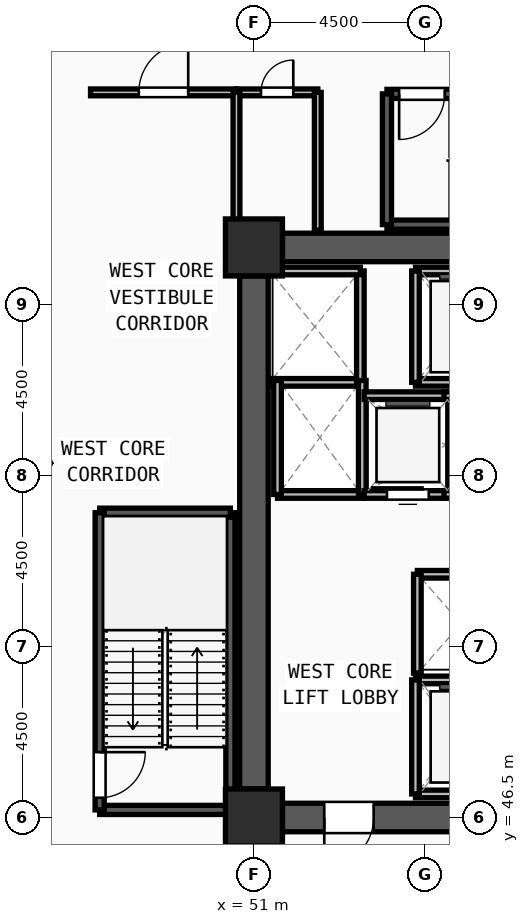
"""IFC4 building model, lengths in metres.
Left out: names, types, materials, properties, quantities, classifications, styles, units other than length and angle.
Written with IfcOpenShell. Run it as: python <this file> out.ifc"""

import sys

from ifc_helpers import new_model, si_unit, direction, frame, frame_2d, origin, origin_2d, place, context, subcontext, project, spatial, rectangle, extrude, source, transform, mapped, element, fill, save


model = new_model("IFC4")
c1 = context("Model", 3, precision=1e-05, world=origin(), true_north=direction((0.0, 1.0)))
c2 = subcontext(c1, "Body", "Model", "MODEL_VIEW")
j1 = project(units=[si_unit("LENGTHUNIT", "METRE"), si_unit("PLANEANGLEUNIT", "RADIAN")], contexts=[c1])
p1 = place(None, origin())
s1 = spatial("IfcSite", under=j1, at=p1, CompositionType="ELEMENT")
p2 = place(p1, origin())
s2 = spatial("IfcBuilding", under=s1, at=p2, CompositionType="ELEMENT")
p3 = place(p2, frame((0.0, 0.0, 102.0)))
s3 = spatial("IfcBuildingStorey", under=s2, at=p3, CompositionType="ELEMENT", Elevation=102.0)
m1 = source(origin(), c2, "Body", "SweptSolid", [
    extrude(rectangle(XDim=1.5, YDim=1.5, at=origin_2d()), origin(), (0.0, 0.0, 1.0), 3.75),
])
for number, where, z_axis, x_axis in (
    (1, (51.0, 46.5, 0.0), (0.0, 0.0, 1.0), (1.0, 0.0, 0.0)),
    (2, (51.0, 61.5, 0.0), (0.0, 0.0, 1.0), (1.0, 0.0, 0.0)),
):
    element("IfcColumn", number, at=place(p3, frame(where, z_axis=z_axis, x_axis=x_axis)), inside=s3, PredefinedType="COLUMN", context=c2, shape_type="MappedRepresentation", body=[
        mapped(m1, transform((0.0, 0.0, 0.0), x_axis=(1.0, 0.0, 0.0), y_axis=(0.0, 1.0, 0.0), z_axis=(0.0, 0.0, 1.0), scale=1.0)),
    ])
p4 = place(p3, frame((51.75, 61.5, 0.0), z_axis=(0.0, 0.0, 1.0), x_axis=(1.0, 0.0, 0.0)))
e3 = element("IfcWall", 3, at=p4, inside=s3, PredefinedType="SHEAR", context=c2, shape_type="SweptSolid", body=[
    extrude(rectangle(XDim=7.5, YDim=0.75, at=frame_2d((3.75, 0.0))), origin(), (0.0, 0.0, 1.0), 3.57),
])
p5 = place(p3, frame((59.25, 46.5, 0.0), z_axis=(0.0, 0.0, 1.0), x_axis=(-1.0, 0.0, 0.0)))
e4 = element("IfcWall", 4, at=p5, inside=s3, PredefinedType="SHEAR", context=c2, shape_type="SweptSolid", body=[
    extrude(rectangle(XDim=7.5, YDim=0.75, at=frame_2d((3.75, 0.0))), origin(), (0.0, 0.0, 1.0), 3.57),
])
m2 = source(origin(), c2, "Body", "SweptSolid", [
    extrude(rectangle(XDim=1.3, YDim=2.2, at=frame_2d((0.65, 1.1))), frame((0.0, 0.385, 0.0), z_axis=(0.0, -1.0, 0.0), x_axis=(1.0, 0.0, 0.0)), (0.0, 0.0, 1.0), 0.77),
])
p6 = place(p5, frame((5.1, 0.0, 0.0)))
e5 = element("IfcOpeningElement", 5, at=p6, cuts=e4, PredefinedType="OPENING", context=c2, shape_type="MappedRepresentation", body=[
    mapped(m2, transform((0.0, 0.0, 0.0), x_axis=(1.0, 0.0, 0.0), y_axis=(0.0, 1.0, 0.0), z_axis=(0.0, 0.0, 1.0), scale=1.0)),
])
m3 = source(origin(), c2, "Body", "SweptSolid", [
    extrude(rectangle(XDim=1.0, YDim=2.2, at=frame_2d((0.5, 1.1))), frame((0.0, 0.385, 0.0), z_axis=(0.0, -1.0, 0.0), x_axis=(1.0, 0.0, 0.0)), (0.0, 0.0, 1.0), 0.77),
])
p7 = place(p5, frame((0.6, 0.0, 0.0)))
e6 = element("IfcOpeningElement", 6, at=p7, cuts=e4, PredefinedType="OPENING", context=c2, shape_type="MappedRepresentation", body=[
    mapped(m3, transform((0.0, 0.0, 0.0), x_axis=(1.0, 0.0, 0.0), y_axis=(0.0, 1.0, 0.0), z_axis=(0.0, 0.0, 1.0), scale=1.0)),
])
p8 = place(p3, frame((51.0, 47.25, 0.0), z_axis=(0.0, 0.0, 1.0), x_axis=(0.0, 1.0, 0.0)))
e7 = element("IfcWall", 7, at=p8, inside=s3, PredefinedType="SHEAR", context=c2, shape_type="SweptSolid", body=[
    extrude(rectangle(XDim=13.5, YDim=0.75, at=frame_2d((6.75, 0.0))), origin(), (0.0, 0.0, 1.0), 3.57),
])
p9 = place(p3, frame((46.94, 46.7, 0.0), z_axis=(0.0, 0.0, 1.0), x_axis=(1.0, 0.0, 0.0)))
e8 = element("IfcWall", 8, at=p9, inside=s3, PredefinedType="SOLIDWALL", context=c2, shape_type="SweptSolid", body=[
    extrude(rectangle(XDim=3.44, YDim=0.24, at=frame_2d((1.72, 0.0))), origin(), (0.0, 0.0, 1.0), 3.57),
])
p10 = place(p3, frame((50.38, 46.7, 0.0), z_axis=(0.0, 0.0, 1.0), x_axis=(0.0, 1.0, 0.0)))
e9 = element("IfcWall", 9, at=p10, inside=s3, PredefinedType="SOLIDWALL", context=c2, shape_type="SweptSolid", body=[
    extrude(rectangle(XDim=7.82, YDim=0.24, at=frame_2d((3.91, 0.0))), origin(), (0.0, 0.0, 1.0), 3.57),
])
p11 = place(p3, frame((50.38, 54.52, 0.0), z_axis=(0.0, 0.0, 1.0), x_axis=(-1.0, 0.0, 0.0)))
e10 = element("IfcWall", 10, at=p11, inside=s3, PredefinedType="SOLIDWALL", context=c2, shape_type="SweptSolid", body=[
    extrude(rectangle(XDim=3.44, YDim=0.24, at=frame_2d((1.72, 0.0))), origin(), (0.0, 0.0, 1.0), 3.57),
])
p12 = place(p3, frame((46.94, 54.52, 0.0), z_axis=(0.0, 0.0, 1.0), x_axis=(0.0, -1.0, 0.0)))
e11 = element("IfcWall", 11, at=p12, inside=s3, PredefinedType="SOLIDWALL", context=c2, shape_type="SweptSolid", body=[
    extrude(rectangle(XDim=7.82, YDim=0.24, at=frame_2d((3.91, 0.0))), origin(), (0.0, 0.0, 1.0), 3.57),
])
m4 = source(origin(), c2, "Body", "SweptSolid", [
    extrude(rectangle(XDim=1.2, YDim=2.2, at=frame_2d((0.6, 1.1))), frame((0.0, 0.13, 0.0), z_axis=(0.0, -1.0, 0.0), x_axis=(1.0, 0.0, 0.0)), (0.0, 0.0, 1.0), 0.26),
])
p13 = place(p12, frame((6.3, 0.0, 0.0)))
e12 = element("IfcOpeningElement", 12, at=p13, cuts=e11, PredefinedType="OPENING", context=c2, shape_type="MappedRepresentation", body=[
    mapped(m4, transform((0.0, 0.0, 0.0), x_axis=(1.0, 0.0, 0.0), y_axis=(0.0, 1.0, 0.0), z_axis=(0.0, 0.0, 1.0), scale=1.0)),
])
p14 = place(p3, frame((54.5, 62.1, 0.0), z_axis=(0.0, 0.0, 1.0), x_axis=(1.0, 0.0, 0.0)))
e13 = element("IfcWall", 13, at=p14, inside=s3, PredefinedType="SOLIDWALL", context=c2, shape_type="SweptSolid", body=[
    extrude(rectangle(XDim=7.82, YDim=0.24, at=frame_2d((3.91, 0.0))), origin(), (0.0, 0.0, 1.0), 3.57),
])
p15 = place(p3, frame((62.32, 65.54, 0.0), z_axis=(0.0, 0.0, 1.0), x_axis=(-1.0, 0.0, 0.0)))
e14 = element("IfcWall", 14, at=p15, inside=s3, PredefinedType="SOLIDWALL", context=c2, shape_type="SweptSolid", body=[
    extrude(rectangle(XDim=7.82, YDim=0.24, at=frame_2d((3.91, 0.0))), origin(), (0.0, 0.0, 1.0), 3.57),
])
p16 = place(p15, frame((6.3, 0.0, 0.0)))
e15 = element("IfcOpeningElement", 15, at=p16, cuts=e14, PredefinedType="OPENING", context=c2, shape_type="MappedRepresentation", body=[
    mapped(m4, transform((0.0, 0.0, 0.0), x_axis=(1.0, 0.0, 0.0), y_axis=(0.0, 1.0, 0.0), z_axis=(0.0, 0.0, 1.0), scale=1.0)),
])
p17 = place(p3, frame((54.5, 65.54, 0.0), z_axis=(0.0, 0.0, 1.0), x_axis=(0.0, -1.0, 0.0)))
e16 = element("IfcWall", 16, at=p17, inside=s3, PredefinedType="SOLIDWALL", context=c2, shape_type="SweptSolid", body=[
    extrude(rectangle(XDim=3.44, YDim=0.24, at=frame_2d((1.72, 0.0))), origin(), (0.0, 0.0, 1.0), 3.57),
])
for number, where, z_axis, x_axis in (
    (17, (55.25, 47.12, 0.0), (0.0, 0.0, 1.0), (1.0, 0.0, 0.0)),
    (18, (57.65, 50.12, 0.0), (0.0, 0.0, 1.0), (-1.0, 0.0, 0.0)),
):
    element("IfcWall", number, at=place(p3, frame(where, z_axis=z_axis, x_axis=x_axis)), inside=s3, PredefinedType="SOLIDWALL", context=c2, shape_type="SweptSolid", body=[
        extrude(rectangle(XDim=2.4, YDim=0.2, at=frame_2d((1.2, 0.0))), origin(), (0.0, 0.0, 1.0), 3.57),
    ])
p18 = place(p3, frame((55.25, 50.12, 0.0), z_axis=(0.0, 0.0, 1.0), x_axis=(0.0, -1.0, 0.0)))
e19 = element("IfcWall", 19, at=p18, inside=s3, PredefinedType="SOLIDWALL", context=c2, shape_type="SweptSolid", body=[
    extrude(rectangle(XDim=3.0, YDim=0.2, at=frame_2d((1.5, 0.0))), origin(), (0.0, 0.0, 1.0), 3.57),
])
for number, where, z_axis, x_axis in (
    (20, (55.25, 57.95, 0.0), (0.0, 0.0, 1.0), (1.0, 0.0, 0.0)),
    (21, (57.65, 60.88, 0.0), (0.0, 0.0, 1.0), (-1.0, 0.0, 0.0)),
):
    element("IfcWall", number, at=place(p3, frame(where, z_axis=z_axis, x_axis=x_axis)), inside=s3, PredefinedType="SOLIDWALL", context=c2, shape_type="SweptSolid", body=[
        extrude(rectangle(XDim=2.4, YDim=0.2, at=frame_2d((1.2, 0.0))), origin(), (0.0, 0.0, 1.0), 3.57),
    ])
p19 = place(p3, frame((55.25, 60.88, 0.0), z_axis=(0.0, 0.0, 1.0), x_axis=(0.0, -1.0, 0.0)))
e22 = element("IfcWall", 22, at=p19, inside=s3, PredefinedType="SOLIDWALL", context=c2, shape_type="SweptSolid", body=[
    extrude(rectangle(XDim=2.93, YDim=0.2, at=frame_2d((1.465, 0.0))), origin(), (0.0, 0.0, 1.0), 3.57),
])
p20 = place(p3, frame((51.4, 57.95, 0.0), z_axis=(0.0, 0.0, 1.0), x_axis=(1.0, 0.0, 0.0)))
e23 = element("IfcWall", 23, at=p20, inside=s3, PredefinedType="SOLIDWALL", context=c2, shape_type="SweptSolid", body=[
    extrude(rectangle(XDim=2.4, YDim=0.2, at=frame_2d((1.2, 0.0))), origin(), (0.0, 0.0, 1.0), 3.57),
])
p21 = place(p3, frame((53.8, 57.95, 0.0), z_axis=(0.0, 0.0, 1.0), x_axis=(0.0, 1.0, 0.0)))
e24 = element("IfcWall", 24, at=p21, inside=s3, PredefinedType="SOLIDWALL", context=c2, shape_type="SweptSolid", body=[
    extrude(rectangle(XDim=2.93, YDim=0.2, at=frame_2d((1.465, 0.0))), origin(), (0.0, 0.0, 1.0), 3.57),
])
p22 = place(p3, frame((53.8, 60.88, 0.0), z_axis=(0.0, 0.0, 1.0), x_axis=(-1.0, 0.0, 0.0)))
e25 = element("IfcWall", 25, at=p22, inside=s3, PredefinedType="SOLIDWALL", context=c2, shape_type="SweptSolid", body=[
    extrude(rectangle(XDim=2.4, YDim=0.2, at=frame_2d((1.2, 0.0))), origin(), (0.0, 0.0, 1.0), 3.57),
])
p23 = place(p3, frame((51.62, 55.0, 0.0), z_axis=(0.0, 0.0, 1.0), x_axis=(1.0, 0.0, 0.0)))
e26 = element("IfcWall", 26, at=p23, inside=s3, PredefinedType="SOLIDWALL", context=c2, shape_type="SweptSolid", body=[
    extrude(rectangle(XDim=2.23, YDim=0.2, at=frame_2d((1.115, 0.0))), origin(), (0.0, 0.0, 1.0), 3.57),
])
for number, where, z_axis, x_axis in (
    (27, (53.85, 55.0, 0.0), (0.0, 0.0, 1.0), (0.0, 1.0, 0.0)),
    (28, (51.62, 58.0, 0.0), (0.0, 0.0, 1.0), (0.0, -1.0, 0.0)),
):
    element("IfcWall", number, at=place(p3, frame(where, z_axis=z_axis, x_axis=x_axis)), inside=s3, PredefinedType="SOLIDWALL", context=c2, shape_type="SweptSolid", body=[
        extrude(rectangle(XDim=3.0, YDim=0.2, at=frame_2d((1.5, 0.0))), origin(), (0.0, 0.0, 1.0), 3.57),
    ])
p24 = place(p3, frame((57.6, 52.9, 0.0), z_axis=(0.0, 0.0, 1.0), x_axis=(-1.0, 0.0, 0.0)))
e29 = element("IfcWall", 29, at=p24, inside=s3, PredefinedType="SOLIDWALL", context=c2, shape_type="SweptSolid", body=[
    extrude(rectangle(XDim=2.3, YDim=0.2, at=frame_2d((1.15, 0.0))), origin(), (0.0, 0.0, 1.0), 3.57),
])
p25 = place(p3, frame((55.3, 52.9, 0.0), z_axis=(0.0, 0.0, 1.0), x_axis=(0.0, -1.0, 0.0)))
e30 = element("IfcWall", 30, at=p25, inside=s3, PredefinedType="SOLIDWALL", context=c2, shape_type="SweptSolid", body=[
    extrude(rectangle(XDim=2.6, YDim=0.2, at=frame_2d((1.3, 0.0))), origin(), (0.0, 0.0, 1.0), 3.57),
])
p26 = place(p3, frame((53.9, 55.0, 0.0), z_axis=(0.0, 0.0, 1.0), x_axis=(1.0, 0.0, 0.0)))
e31 = element("IfcWall", 31, at=p26, inside=s3, PredefinedType="SOLIDWALL", context=c2, shape_type="SweptSolid", body=[
    extrude(rectangle(XDim=2.3, YDim=0.2, at=frame_2d((1.15, 0.0))), origin(), (0.0, 0.0, 1.0), 3.57),
])
m5 = source(origin(), c2, "Body", "SweptSolid", [
    extrude(rectangle(XDim=1.1, YDim=2.2, at=frame_2d((0.55, 1.1))), frame((0.0, 0.11, 0.0), z_axis=(0.0, -1.0, 0.0), x_axis=(1.0, 0.0, 0.0)), (0.0, 0.0, 1.0), 0.22),
])
p27 = place(p26, frame((0.6, 0.0, 0.0)))
e32 = element("IfcOpeningElement", 32, at=p27, cuts=e31, PredefinedType="OPENING", context=c2, shape_type="MappedRepresentation", body=[
    mapped(m5, transform((0.0, 0.0, 0.0), x_axis=(1.0, 0.0, 0.0), y_axis=(0.0, 1.0, 0.0), z_axis=(0.0, 0.0, 1.0), scale=1.0)),
])
p28 = place(p3, frame((56.2, 55.0, 0.0), z_axis=(0.0, 0.0, 1.0), x_axis=(0.0, 1.0, 0.0)))
e33 = element("IfcWall", 33, at=p28, inside=s3, PredefinedType="SOLIDWALL", context=c2, shape_type="SweptSolid", body=[
    extrude(rectangle(XDim=2.6, YDim=0.2, at=frame_2d((1.3, 0.0))), origin(), (0.0, 0.0, 1.0), 3.57),
])
p29 = place(p3, frame((56.2, 57.6, 0.0), z_axis=(0.0, 0.0, 1.0), x_axis=(-1.0, 0.0, 0.0)))
e34 = element("IfcWall", 34, at=p29, inside=s3, PredefinedType="SOLIDWALL", context=c2, shape_type="SweptSolid", body=[
    extrude(rectangle(XDim=2.3, YDim=0.2, at=frame_2d((1.15, 0.0))), origin(), (0.0, 0.0, 1.0), 3.57),
])
p30 = place(p3, frame((56.0, 55.0, 0.0), z_axis=(0.0, 0.0, 1.0), x_axis=(1.0, 0.0, 0.0)))
e35 = element("IfcWall", 35, at=p30, inside=s3, PredefinedType="SOLIDWALL", context=c2, shape_type="SweptSolid", body=[
    extrude(rectangle(XDim=2.2, YDim=0.2, at=frame_2d((1.1, 0.0))), origin(), (0.0, 0.0, 1.0), 3.57),
])
p31 = place(p30, frame((0.55, 0.0, 0.0)))
e36 = element("IfcOpeningElement", 36, at=p31, cuts=e35, PredefinedType="OPENING", context=c2, shape_type="MappedRepresentation", body=[
    mapped(m5, transform((0.0, 0.0, 0.0), x_axis=(1.0, 0.0, 0.0), y_axis=(0.0, 1.0, 0.0), z_axis=(0.0, 0.0, 1.0), scale=1.0)),
])
p32 = place(p3, frame((58.2, 57.6, 0.0), z_axis=(0.0, 0.0, 1.0), x_axis=(-1.0, 0.0, 0.0)))
e37 = element("IfcWall", 37, at=p32, inside=s3, PredefinedType="SOLIDWALL", context=c2, shape_type="SweptSolid", body=[
    extrude(rectangle(XDim=2.2, YDim=0.2, at=frame_2d((1.1, 0.0))), origin(), (0.0, 0.0, 1.0), 3.57),
])
p33 = place(p3, frame((50.54, 65.58, 0.0), z_axis=(0.0, 0.0, 1.0), x_axis=(1.0, 0.0, 0.0)))
e38 = element("IfcWall", 38, at=p33, inside=s3, PredefinedType="PARTITIONING", context=c2, shape_type="SweptSolid", body=[
    extrude(rectangle(XDim=2.14, YDim=0.18, at=frame_2d((1.07, 0.0))), origin(), (0.0, 0.0, 1.0), 3.57),
])
m6 = source(origin(), c2, "Body", "SweptSolid", [
    extrude(rectangle(XDim=0.85, YDim=2.1, at=frame_2d((0.425, 1.05))), frame((0.0, 0.1, 0.0), z_axis=(0.0, -1.0, 0.0), x_axis=(1.0, 0.0, 0.0)), (0.0, 0.0, 1.0), 0.2),
])
p34 = place(p33, frame((0.645, 0.0, 0.0)))
e39 = element("IfcOpeningElement", 39, at=p34, cuts=e38, PredefinedType="OPENING", context=c2, shape_type="MappedRepresentation", body=[
    mapped(m6, transform((0.0, 0.0, 0.0), x_axis=(1.0, 0.0, 0.0), y_axis=(0.0, 1.0, 0.0), z_axis=(0.0, 0.0, 1.0), scale=1.0)),
])
p35 = place(p3, frame((46.7, 65.58, 0.0), z_axis=(0.0, 0.0, 1.0), x_axis=(1.0, 0.0, 0.0)))
e40 = element("IfcWall", 40, at=p35, inside=s3, PredefinedType="PARTITIONING", context=c2, shape_type="SweptSolid", body=[
    extrude(rectangle(XDim=3.84, YDim=0.18, at=frame_2d((1.92, 0.0))), origin(), (0.0, 0.0, 1.0), 3.57),
])
m7 = source(origin(), c2, "Body", "SweptSolid", [
    extrude(rectangle(XDim=1.3, YDim=2.2, at=frame_2d((0.65, 1.1))), frame((0.0, 0.1, 0.0), z_axis=(0.0, -1.0, 0.0), x_axis=(1.0, 0.0, 0.0)), (0.0, 0.0, 1.0), 0.2),
])
p36 = place(p35, frame((1.27, 0.0, 0.0)))
e41 = element("IfcOpeningElement", 41, at=p36, cuts=e40, PredefinedType="OPENING", context=c2, shape_type="MappedRepresentation", body=[
    mapped(m7, transform((0.0, 0.0, 0.0), x_axis=(1.0, 0.0, 0.0), y_axis=(0.0, 1.0, 0.0), z_axis=(0.0, 0.0, 1.0), scale=1.0)),
])
for number, where, z_axis, x_axis in (
    (42, (50.54, 61.95, 0.0), (0.0, 0.0, 1.0), (0.0, 1.0, 0.0)),
    (43, (52.68, 61.95, 0.0), (0.0, 0.0, 1.0), (0.0, 1.0, 0.0)),
):
    element("IfcWall", number, at=place(p3, frame(where, z_axis=z_axis, x_axis=x_axis)), inside=s3, PredefinedType="PARTITIONING", context=c2, shape_type="SweptSolid", body=[
        extrude(rectangle(XDim=3.63, YDim=0.18, at=frame_2d((1.815, 0.0))), origin(), (0.0, 0.0, 1.0), 3.57),
    ])
m8 = source(origin(), c2, "Body", "SweptSolid", [
    extrude(rectangle(XDim=1.3, YDim=2.2, at=frame_2d((0.65, 1.1))), frame((0.0, 0.025, 0.0), z_axis=(0.0, -1.0, 0.0), x_axis=(1.0, 0.0, 0.0)), (0.0, 0.0, 1.0), 0.05),
])
p37 = place(p6, origin())
e44 = element("IfcDoor", 44, at=p37, inside=s3, OperationType="SINGLE_SWING_RIGHT", PredefinedType="DOOR", context=c2, shape_type="MappedRepresentation", body=[
    mapped(m8, transform((0.0, 0.0, 0.0), x_axis=(1.0, 0.0, 0.0), y_axis=(0.0, 1.0, 0.0), z_axis=(0.0, 0.0, 1.0), scale=1.0)),
])
fill(e5, e44)
m9 = source(origin(), c2, "Body", "SweptSolid", [
    extrude(rectangle(XDim=1.2, YDim=2.2, at=frame_2d((0.6, 1.1))), frame((0.0, 0.025, 0.0), z_axis=(0.0, -1.0, 0.0), x_axis=(1.0, 0.0, 0.0)), (0.0, 0.0, 1.0), 0.05),
])
p38 = place(p13, origin())
e45 = element("IfcDoor", 45, at=p38, inside=s3, OperationType="SINGLE_SWING_LEFT", PredefinedType="DOOR", context=c2, shape_type="MappedRepresentation", body=[
    mapped(m9, transform((0.0, 0.0, 0.0), x_axis=(1.0, 0.0, 0.0), y_axis=(0.0, 1.0, 0.0), z_axis=(0.0, 0.0, 1.0), scale=1.0)),
])
fill(e12, e45)
p39 = place(p16, origin())
e46 = element("IfcDoor", 46, at=p39, inside=s3, OperationType="SINGLE_SWING_RIGHT", PredefinedType="DOOR", context=c2, shape_type="MappedRepresentation", body=[
    mapped(m9, transform((0.0, 0.0, 0.0), x_axis=(1.0, 0.0, 0.0), y_axis=(0.0, 1.0, 0.0), z_axis=(0.0, 0.0, 1.0), scale=1.0)),
])
fill(e15, e46)
m10 = source(origin(), c2, "Body", "SweptSolid", [
    extrude(rectangle(XDim=1.1, YDim=2.2, at=frame_2d((0.55, 1.1))), frame((0.0, 0.025, 0.0), z_axis=(0.0, -1.0, 0.0), x_axis=(1.0, 0.0, 0.0)), (0.0, 0.0, 1.0), 0.05),
])
p40 = place(p27, origin())
e47 = element("IfcDoor", 47, at=p40, inside=s3, OperationType="SLIDING_TO_LEFT", PredefinedType="DOOR", context=c2, shape_type="MappedRepresentation", body=[
    mapped(m10, transform((0.0, 0.0, 0.0), x_axis=(1.0, 0.0, 0.0), y_axis=(0.0, 1.0, 0.0), z_axis=(0.0, 0.0, 1.0), scale=1.0)),
])
fill(e32, e47)
m11 = source(origin(), c2, "Body", "SweptSolid", [
    extrude(rectangle(XDim=0.85, YDim=2.1, at=frame_2d((0.425, 1.05))), frame((0.0, 0.025, 0.0), z_axis=(0.0, -1.0, 0.0), x_axis=(1.0, 0.0, 0.0)), (0.0, 0.0, 1.0), 0.05),
])
p41 = place(p34, origin())
e48 = element("IfcDoor", 48, at=p41, inside=s3, OperationType="SINGLE_SWING_RIGHT", PredefinedType="DOOR", context=c2, shape_type="MappedRepresentation", body=[
    mapped(m11, transform((0.0, 0.0, 0.0), x_axis=(1.0, 0.0, 0.0), y_axis=(0.0, 1.0, 0.0), z_axis=(0.0, 0.0, 1.0), scale=1.0)),
])
fill(e39, e48)
p42 = place(p36, origin())
e49 = element("IfcDoor", 49, at=p42, inside=s3, OperationType="SINGLE_SWING_RIGHT", PredefinedType="DOOR", context=c2, shape_type="MappedRepresentation", body=[
    mapped(m8, transform((0.0, 0.0, 0.0), x_axis=(1.0, 0.0, 0.0), y_axis=(0.0, 1.0, 0.0), z_axis=(0.0, 0.0, 1.0), scale=1.0)),
])
fill(e41, e49)
save(model, sys.argv[1])
